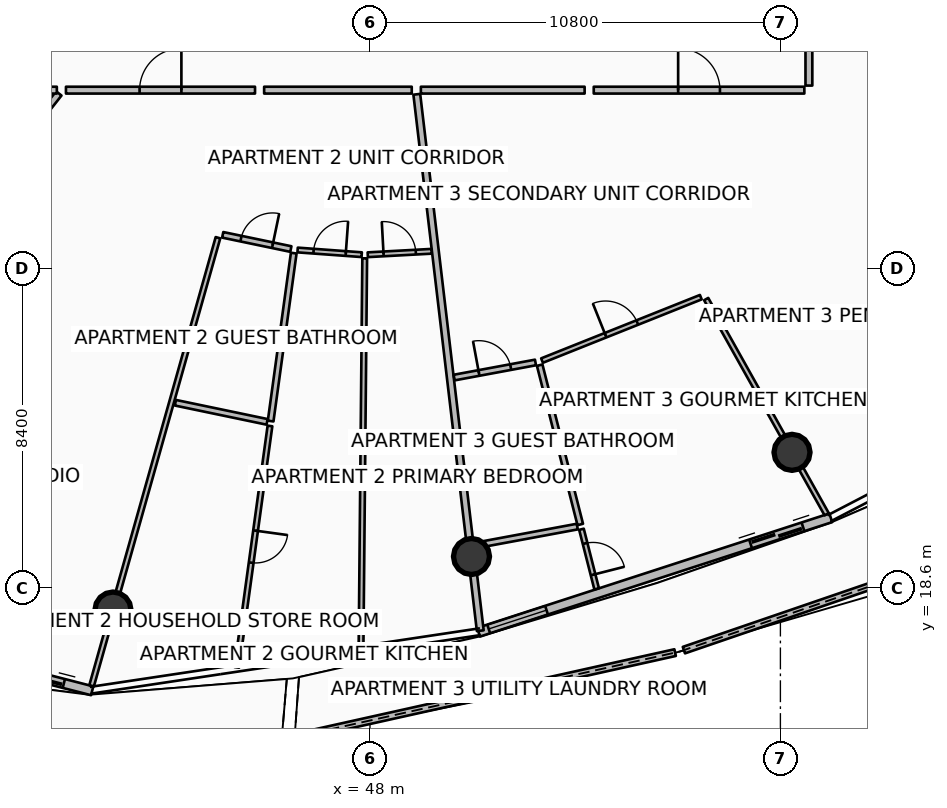
"""IFC4 building model, lengths in metres.
Left out: names, types, materials, properties, quantities, classifications, styles, units other than length and angle.
Written with IfcOpenShell. Run it as: python <this file> out.ifc"""

import sys

from ifc_helpers import new_model, si_unit, direction, frame, frame_2d, origin, origin_2d, place, context, subcontext, project, spatial, polyline, rectangle, circle, outline, extrude, element, fill, save


model = new_model("IFC4")
c1 = context("Model", 3, precision=1e-05, world=origin(), true_north=direction((0.0, 1.0)))
c2 = subcontext(c1, "Body", "Model", "MODEL_VIEW")
j1 = project(units=[si_unit("LENGTHUNIT", "METRE"), si_unit("PLANEANGLEUNIT", "RADIAN")], contexts=[c1])
p1 = place(None, origin())
s1 = spatial("IfcSite", under=j1, at=p1, CompositionType="ELEMENT")
p2 = place(p1, origin())
s2 = spatial("IfcBuilding", under=s1, at=p2, CompositionType="ELEMENT")
p3 = place(p2, frame((0.0, 0.0, 282.9)))
s3 = spatial("IfcBuildingStorey", under=s2, at=p3, CompositionType="ELEMENT", Elevation=282.9)
for number, where, z_axis, x_axis in (
    (1, (41.237, 18.021, 0.0), (0.0, 0.0, 1.0), (1.0, 0.0, 0.0)),
    (2, (50.671, 19.429, 0.0), (0.0, 0.0, 1.0), (1.0, 0.0, 0.0)),
    (3, (59.105, 22.17, 0.0), (0.0, 0.0, 1.0), (1.0, 0.0, 0.0)),
):
    element("IfcColumn", number, at=place(p3, frame(where, z_axis=z_axis, x_axis=x_axis)), inside=s3, PredefinedType="COLUMN", context=c2, shape_type="SweptSolid", body=[
        extrude(circle(Radius=0.475, at=origin_2d()), origin(), (0.0, 0.0, 1.0), 3.59),
    ])
p4 = place(p3, frame((46.017, 14.673, 0.0), z_axis=(0.0, 0.0, 1.0), x_axis=(0.976130464401, 0.217184982143, 0.0)))
e4 = element("IfcWall", 4, at=p4, inside=s3, PredefinedType="PARAPET", context=c2, shape_type="SweptSolid", body=[
    extrude(outline(polyline([(0.0, 0.0), (10.258, 0.0), (10.257, 1.348), (5.129, 1.182), (0.0, 1.12), (0.0, 0.0)])), frame((0.0, 0.09, 0.0), z_axis=(0.0, -1.0, 0.0), x_axis=(1.0, 0.0, 0.0)), (0.0, 0.0, 1.0), 0.18),
])
p5 = place(p3, frame((56.26, 16.966, 0.0), z_axis=(0.0, 0.0, 1.0), x_axis=(0.945994037051, 0.32418402469, 0.0)))
e5 = element("IfcWall", 5, at=p5, inside=s3, PredefinedType="PARAPET", context=c2, shape_type="SweptSolid", body=[
    extrude(outline(polyline([(0.0, 0.0), (10.544, 0.0), (10.544, 1.747), (5.272, 1.562), (0.0, 1.348), (0.0, 0.0)])), frame((0.0, 0.09, 0.0), z_axis=(0.0, -1.0, 0.0), x_axis=(1.0, 0.0, 0.0)), (0.0, 0.0, 1.0), 0.18),
])
p6 = place(p3, frame((29.614, 18.751, 0.0), z_axis=(0.0, 0.0, 1.0), x_axis=(0.968343758421, -0.249620442927, 0.0)))
e6 = element("IfcWall", 6, at=p6, inside=s3, PredefinedType="SOLIDWALL", context=c2, shape_type="SweptSolid", body=[
    extrude(rectangle(XDim=11.438, YDim=0.24, at=frame_2d((5.719, 0.0))), origin(), (0.0, 0.0, 1.0), 2.54),
])
p7 = place(p6, frame((9.218, 0.0, 0.0)))
e7 = element("IfcOpeningElement", 7, at=p7, cuts=e6, PredefinedType="OPENING", context=c2, shape_type="SweptSolid", body=[
    extrude(rectangle(XDim=1.45, YDim=2.15, at=frame_2d((0.725, 1.075))), frame((0.0, 0.13, 0.0), z_axis=(0.0, -1.0, 0.0), x_axis=(1.0, 0.0, 0.0)), (0.0, 0.0, 1.0), 0.26),
])
p8 = place(p6, frame((0.28, 0.0, 0.65)))
e8 = element("IfcOpeningElement", 8, at=p8, cuts=e6, PredefinedType="OPENING", context=c2, shape_type="SweptSolid", body=[
    extrude(rectangle(XDim=1.6, YDim=1.5, at=frame_2d((0.8, 0.75))), frame((0.0, 0.13, 0.0), z_axis=(0.0, -1.0, 0.0), x_axis=(1.0, 0.0, 0.0)), (0.0, 0.0, 1.0), 0.26),
])
p9 = place(p3, frame((50.858, 17.436, 0.0), z_axis=(0.0, 0.0, 1.0), x_axis=(0.951055974609, 0.309018661507, 0.0)))
e9 = element("IfcWall", 9, at=p9, inside=s3, PredefinedType="SOLIDWALL", context=c2, shape_type="SweptSolid", body=[
    extrude(rectangle(XDim=9.745, YDim=0.24, at=frame_2d((4.873, 0.0))), origin(), (0.0, 0.0, 1.0), 2.54),
])
p10 = place(p9, frame((7.525, 0.0, 0.0)))
e10 = element("IfcOpeningElement", 10, at=p10, cuts=e9, PredefinedType="OPENING", context=c2, shape_type="SweptSolid", body=[
    extrude(rectangle(XDim=1.45, YDim=2.15, at=frame_2d((0.725, 1.075))), frame((0.0, 0.13, 0.0), z_axis=(0.0, -1.0, 0.0), x_axis=(1.0, 0.0, 0.0)), (0.0, 0.0, 1.0), 0.26),
])
p11 = place(p9, frame((0.28, 0.0, 0.65)))
e11 = element("IfcOpeningElement", 11, at=p11, cuts=e9, PredefinedType="OPENING", context=c2, shape_type="SweptSolid", body=[
    extrude(rectangle(XDim=1.6, YDim=1.5, at=frame_2d((0.8, 0.75))), frame((0.0, 0.13, 0.0), z_axis=(0.0, -1.0, 0.0), x_axis=(1.0, 0.0, 0.0)), (0.0, 0.0, 1.0), 0.26),
])
p12 = place(p3, frame((39.812, 31.614, 0.0), z_axis=(0.0, 0.0, 1.0), x_axis=(-0.619097230176, -0.785314344443, 0.0)))
e12 = element("IfcWall", 12, at=p12, inside=s3, PredefinedType="PARTITIONING", context=c2, shape_type="SweptSolid", body=[
    extrude(rectangle(XDim=16.37, YDim=0.18, at=frame_2d((8.185, 0.0))), origin(), (0.0, 0.0, 1.0), 2.957),
])
p13 = place(p3, frame((49.232, 31.591, 0.0), z_axis=(0.0, 0.0, 1.0), x_axis=(0.117545848714, -0.993067456646, 0.0)))
e13 = element("IfcWall", 13, at=p13, inside=s3, PredefinedType="PARTITIONING", context=c2, shape_type="SweptSolid", body=[
    extrude(rectangle(XDim=14.213, YDim=0.18, at=frame_2d((7.106, 0.0))), origin(), (0.0, 0.0, 1.0), 2.957),
])
p14 = place(p3, frame((37.42, 31.7, 0.0), z_axis=(0.0, 0.0, 1.0), x_axis=(1.0, 0.0, 0.0)))
e14 = element("IfcWall", 14, at=p14, inside=s3, PredefinedType="PARTITIONING", context=c2, shape_type="SweptSolid", body=[
    extrude(rectangle(XDim=2.34, YDim=0.18, at=frame_2d((1.17, 0.0))), origin(), (0.0, 0.0, 1.0), 2.957),
])
p15 = place(p3, frame((40.0, 31.7, 0.0), z_axis=(0.0, 0.0, 1.0), x_axis=(1.0, 0.0, 0.0)))
e15 = element("IfcWall", 15, at=p15, inside=s3, PredefinedType="PARTITIONING", context=c2, shape_type="SweptSolid", body=[
    extrude(rectangle(XDim=4.975, YDim=0.18, at=frame_2d((2.488, 0.0))), origin(), (0.0, 0.0, 1.0), 2.957),
])
p16 = place(p15, frame((1.938, 0.0, 0.0)))
e16 = element("IfcOpeningElement", 16, at=p16, cuts=e15, PredefinedType="OPENING", context=c2, shape_type="SweptSolid", body=[
    extrude(rectangle(XDim=1.1, YDim=2.1, at=frame_2d((0.55, 1.05))), frame((0.0, 0.1, 0.0), z_axis=(0.0, -1.0, 0.0), x_axis=(1.0, 0.0, 0.0)), (0.0, 0.0, 1.0), 0.2),
])
p17 = place(p3, frame((45.215, 31.7, 0.0), z_axis=(0.0, 0.0, 1.0), x_axis=(1.0, 0.0, 0.0)))
e17 = element("IfcWall", 17, at=p17, inside=s3, PredefinedType="PARTITIONING", context=c2, shape_type="SweptSolid", body=[
    extrude(rectangle(XDim=3.884, YDim=0.18, at=frame_2d((1.942, 0.0))), origin(), (0.0, 0.0, 1.0), 2.957),
])
p18 = place(p3, frame((44.0, 27.817, 0.0), z_axis=(0.0, 0.0, 1.0), x_axis=(-0.271434127064, -0.962457019646, 0.0)))
e18 = element("IfcWall", 18, at=p18, inside=s3, PredefinedType="PARTITIONING", context=c2, shape_type="SweptSolid", body=[
    extrude(rectangle(XDim=12.249, YDim=0.125, at=frame_2d((6.125, 0.0))), origin(), (0.0, 0.0, 1.0), 2.957),
])
p19 = place(p3, frame((44.125, 27.893, 0.0), z_axis=(0.0, 0.0, 1.0), x_axis=(0.978900502262, -0.204337482294, 0.0)))
e19 = element("IfcWall", 19, at=p19, inside=s3, PredefinedType="PARTITIONING", context=c2, shape_type="SweptSolid", body=[
    extrude(rectangle(XDim=1.832, YDim=0.15, at=frame_2d((0.916, 0.0))), origin(), (0.0, 0.0, 1.0), 2.957),
])
p20 = place(p19, frame((0.491, 0.0, 0.0)))
e20 = element("IfcOpeningElement", 20, at=p20, cuts=e19, PredefinedType="OPENING", context=c2, shape_type="SweptSolid", body=[
    extrude(rectangle(XDim=0.85, YDim=2.06, at=frame_2d((0.425, 1.03))), frame((0.0, 0.085, 0.0), z_axis=(0.0, -1.0, 0.0), x_axis=(1.0, 0.0, 0.0)), (0.0, 0.0, 1.0), 0.17),
])
p21 = place(p3, frame((42.879, 23.475, 0.0), z_axis=(0.0, 0.0, 1.0), x_axis=(0.978912814884, -0.204278488479, 0.0)))
e21 = element("IfcWall", 21, at=p21, inside=s3, PredefinedType="PARTITIONING", context=c2, shape_type="SweptSolid", body=[
    extrude(rectangle(XDim=2.466, YDim=0.15, at=frame_2d((1.233, 0.0))), origin(), (0.0, 0.0, 1.0), 2.957),
])
p22 = place(p3, frame((45.994, 27.411, 0.0), z_axis=(0.0, 0.0, 1.0), x_axis=(-0.136246545396, -0.99067496126, 0.0)))
e22 = element("IfcWall", 22, at=p22, inside=s3, PredefinedType="PARTITIONING", context=c2, shape_type="SweptSolid", body=[
    extrude(rectangle(XDim=4.46, YDim=0.15, at=frame_2d((2.23, 0.0))), origin(), (0.0, 0.0, 1.0), 3.03),
])
p23 = place(p3, frame((45.368, 22.864, 0.0), z_axis=(0.0, 0.0, 1.0), x_axis=(-0.136200589596, -0.99068128043, 0.0)))
e23 = element("IfcWall", 23, at=p23, inside=s3, PredefinedType="PARTITIONING", context=c2, shape_type="SweptSolid", body=[
    extrude(rectangle(XDim=6.412, YDim=0.125, at=frame_2d((3.206, 0.0))), origin(), (0.0, 0.0, 1.0), 3.03),
])
p24 = place(p23, frame((2.781, 0.0, 0.0)))
e24 = element("IfcOpeningElement", 24, at=p24, cuts=e23, PredefinedType="OPENING", context=c2, shape_type="SweptSolid", body=[
    extrude(rectangle(XDim=0.85, YDim=2.06, at=frame_2d((0.425, 1.03))), frame((0.0, 0.073, 0.0), z_axis=(0.0, -1.0, 0.0), x_axis=(1.0, 0.0, 0.0)), (0.0, 0.0, 1.0), 0.145),
])
p25 = place(p3, frame((47.861, 27.275, 0.0), z_axis=(0.0, 0.0, 1.0), x_axis=(-0.009436905939, -0.999955471412, 0.0)))
e25 = element("IfcWall", 25, at=p25, inside=s3, PredefinedType="PARTITIONING", context=c2, shape_type="SweptSolid", body=[
    extrude(rectangle(XDim=10.271, YDim=0.125, at=frame_2d((5.135, 0.0))), origin(), (0.0, 0.0, 1.0), 3.03),
])
p26 = place(p3, frame((46.096, 27.494, 0.0), z_axis=(0.0, 0.0, 1.0), x_axis=(0.997337823183, -0.072919588925, 0.0)))
e26 = element("IfcWall", 26, at=p26, inside=s3, PredefinedType="PARTITIONING", context=c2, shape_type="SweptSolid", body=[
    extrude(rectangle(XDim=1.691, YDim=0.125, at=frame_2d((0.845, 0.0))), origin(), (0.0, 0.0, 1.0), 3.03),
])
p27 = place(p26, frame((0.42, 0.0, 0.0)))
e27 = element("IfcOpeningElement", 27, at=p27, cuts=e26, PredefinedType="OPENING", context=c2, shape_type="SweptSolid", body=[
    extrude(rectangle(XDim=0.85, YDim=2.06, at=frame_2d((0.425, 1.03))), frame((0.0, 0.073, 0.0), z_axis=(0.0, -1.0, 0.0), x_axis=(1.0, 0.0, 0.0)), (0.0, 0.0, 1.0), 0.145),
])
p28 = place(p3, frame((47.942, 27.369, 0.0), z_axis=(0.0, 0.0, 1.0), x_axis=(0.998523596101, 0.054319683628, 0.0)))
e28 = element("IfcWall", 28, at=p28, inside=s3, PredefinedType="PARTITIONING", context=c2, shape_type="SweptSolid", body=[
    extrude(rectangle(XDim=1.681, YDim=0.125, at=frame_2d((0.84, 0.0))), origin(), (0.0, 0.0, 1.0), 3.03),
])
p29 = place(p28, frame((0.415, 0.0, 0.0)))
e29 = element("IfcOpeningElement", 29, at=p29, cuts=e28, PredefinedType="OPENING", context=c2, shape_type="SweptSolid", body=[
    extrude(rectangle(XDim=0.85, YDim=2.06, at=frame_2d((0.425, 1.03))), frame((0.0, 0.073, 0.0), z_axis=(0.0, -1.0, 0.0), x_axis=(1.0, 0.0, 0.0)), (0.0, 0.0, 1.0), 0.145),
])
p30 = place(p3, frame((53.888, 31.7, 0.0), z_axis=(0.0, 0.0, 1.0), x_axis=(1.0, 0.0, 0.0)))
e30 = element("IfcWall", 30, at=p30, inside=s3, PredefinedType="PARTITIONING", context=c2, shape_type="SweptSolid", body=[
    extrude(rectangle(XDim=5.542, YDim=0.18, at=frame_2d((2.771, 0.0))), origin(), (0.0, 0.0, 1.0), 2.957),
])
p31 = place(p30, frame((2.221, 0.0, 0.0)))
e31 = element("IfcOpeningElement", 31, at=p31, cuts=e30, PredefinedType="OPENING", context=c2, shape_type="SweptSolid", body=[
    extrude(rectangle(XDim=1.1, YDim=2.1, at=frame_2d((0.55, 1.05))), frame((0.0, 0.1, 0.0), z_axis=(0.0, -1.0, 0.0), x_axis=(1.0, 0.0, 0.0)), (0.0, 0.0, 1.0), 0.2),
])
p32 = place(p3, frame((59.55, 31.82, 0.0), z_axis=(0.0, 0.0, 1.0), x_axis=(0.0, 1.0, 0.0)))
e32 = element("IfcWall", 32, at=p32, inside=s3, PredefinedType="PARTITIONING", context=c2, shape_type="SweptSolid", body=[
    extrude(rectangle(XDim=0.955, YDim=0.18, at=frame_2d((0.477, 0.0))), origin(), (0.0, 0.0, 1.0), 2.957),
])
p33 = place(p3, frame((49.339, 31.7, 0.0), z_axis=(0.0, 0.0, 1.0), x_axis=(1.0, 0.0, 0.0)))
e33 = element("IfcWall", 33, at=p33, inside=s3, PredefinedType="PARTITIONING", context=c2, shape_type="SweptSolid", body=[
    extrude(rectangle(XDim=4.309, YDim=0.18, at=frame_2d((2.155, 0.0))), origin(), (0.0, 0.0, 1.0), 2.957),
])
p34 = place(p3, frame((56.847, 26.203, 0.0), z_axis=(0.0, 0.0, 1.0), x_axis=(0.488636594114, -0.872487409017, 0.0)))
e34 = element("IfcWall", 34, at=p34, inside=s3, PredefinedType="PARTITIONING", context=c2, shape_type="SweptSolid", body=[
    extrude(rectangle(XDim=6.489, YDim=0.125, at=frame_2d((3.244, 0.0))), origin(), (0.0, 0.0, 1.0), 2.957),
])
p35 = place(p3, frame((50.215, 24.137, 0.0), z_axis=(0.0, 0.0, 1.0), x_axis=(0.983215758485, 0.182446628542, 0.0)))
e35 = element("IfcWall", 35, at=p35, inside=s3, PredefinedType="PARTITIONING", context=c2, shape_type="SweptSolid", body=[
    extrude(rectangle(XDim=2.177, YDim=0.15, at=frame_2d((1.089, 0.0))), origin(), (0.0, 0.0, 1.0), 2.957),
])
p36 = place(p35, frame((0.664, 0.0, 0.0)))
e36 = element("IfcOpeningElement", 36, at=p36, cuts=e35, PredefinedType="OPENING", context=c2, shape_type="SweptSolid", body=[
    extrude(rectangle(XDim=0.85, YDim=2.06, at=frame_2d((0.425, 1.03))), frame((0.0, 0.085, 0.0), z_axis=(0.0, -1.0, 0.0), x_axis=(1.0, 0.0, 0.0)), (0.0, 0.0, 1.0), 0.17),
])
p37 = place(p3, frame((50.738, 19.712, 0.0), z_axis=(0.0, 0.0, 1.0), x_axis=(0.983195760322, 0.18255436693, 0.0)))
e37 = element("IfcWall", 37, at=p37, inside=s3, PredefinedType="PARTITIONING", context=c2, shape_type="SweptSolid", body=[
    extrude(rectangle(XDim=2.763, YDim=0.15, at=frame_2d((1.381, 0.0))), origin(), (0.0, 0.0, 1.0), 2.957),
])
p38 = place(p3, frame((52.466, 24.464, 0.0), z_axis=(0.0, 0.0, 1.0), x_axis=(0.246795883472, -0.969067485731, 0.0)))
e38 = element("IfcWall", 38, at=p38, inside=s3, PredefinedType="PARTITIONING", context=c2, shape_type="SweptSolid", body=[
    extrude(rectangle(XDim=4.326, YDim=0.15, at=frame_2d((2.163, 0.0))), origin(), (0.0, 0.0, 1.0), 3.03),
])
p39 = place(p3, frame((53.565, 20.146, 0.0), z_axis=(0.0, 0.0, 1.0), x_axis=(0.24689818157, -0.969041427359, 0.0)))
e39 = element("IfcWall", 39, at=p39, inside=s3, PredefinedType="PARTITIONING", context=c2, shape_type="SweptSolid", body=[
    extrude(rectangle(XDim=1.619, YDim=0.125, at=frame_2d((0.809, 0.0))), origin(), (0.0, 0.0, 1.0), 3.03),
])
p40 = place(p39, frame((0.385, 0.0, 0.0)))
e40 = element("IfcOpeningElement", 40, at=p40, cuts=e39, PredefinedType="OPENING", context=c2, shape_type="SweptSolid", body=[
    extrude(rectangle(XDim=0.85, YDim=2.06, at=frame_2d((0.425, 1.03))), frame((0.0, 0.073, 0.0), z_axis=(0.0, -1.0, 0.0), x_axis=(1.0, 0.0, 0.0)), (0.0, 0.0, 1.0), 0.145),
])
p41 = place(p3, frame((52.527, 24.584, 0.0), z_axis=(0.0, 0.0, 1.0), x_axis=(0.928678664633, 0.370885343274, 0.0)))
e41 = element("IfcWall", 41, at=p41, inside=s3, PredefinedType="PARTITIONING", context=c2, shape_type="SweptSolid", body=[
    extrude(rectangle(XDim=4.499, YDim=0.125, at=frame_2d((2.249, 0.0))), origin(), (0.0, 0.0, 1.0), 2.957),
])
p42 = place(p41, frame((1.799, 0.0, 0.0)))
e42 = element("IfcOpeningElement", 42, at=p42, cuts=e41, PredefinedType="OPENING", context=c2, shape_type="SweptSolid", body=[
    extrude(rectangle(XDim=0.9, YDim=2.08, at=frame_2d((0.45, 1.04))), frame((0.0, 0.073, 0.0), z_axis=(0.0, -1.0, 0.0), x_axis=(1.0, 0.0, 0.0)), (0.0, 0.0, 1.0), 0.145),
])
p43 = place(p7, origin())
e43 = element("IfcDoor", 43, at=p43, inside=s3, OperationType="DOUBLE_DOOR_SLIDING", PredefinedType="DOOR", context=c2, shape_type="SweptSolid", body=[
    extrude(rectangle(XDim=1.45, YDim=2.15, at=frame_2d((0.725, 1.075))), frame((0.0, 0.025, 0.0), z_axis=(0.0, -1.0, 0.0), x_axis=(1.0, 0.0, 0.0)), (0.0, 0.0, 1.0), 0.05),
])
fill(e7, e43)
p44 = place(p10, origin())
e44 = element("IfcDoor", 44, at=p44, inside=s3, OperationType="DOUBLE_DOOR_SLIDING", PredefinedType="DOOR", context=c2, shape_type="SweptSolid", body=[
    extrude(rectangle(XDim=1.45, YDim=2.15, at=frame_2d((0.725, 1.075))), frame((0.0, 0.025, 0.0), z_axis=(0.0, -1.0, 0.0), x_axis=(1.0, 0.0, 0.0)), (0.0, 0.0, 1.0), 0.05),
])
fill(e10, e44)
p45 = place(p11, origin())
e45 = element("IfcWindow", 45, at=p45, inside=s3, PartitioningType="SINGLE_PANEL", PredefinedType="WINDOW", context=c2, shape_type="SweptSolid", body=[
    extrude(rectangle(XDim=1.6, YDim=1.5, at=frame_2d((0.8, 0.75))), frame((0.0, 0.03, 0.0), z_axis=(0.0, -1.0, 0.0), x_axis=(1.0, 0.0, 0.0)), (0.0, 0.0, 1.0), 0.06),
])
fill(e11, e45)
p46 = place(p16, origin())
e46 = element("IfcDoor", 46, at=p46, inside=s3, OperationType="SINGLE_SWING_RIGHT", PredefinedType="DOOR", context=c2, shape_type="SweptSolid", body=[
    extrude(rectangle(XDim=1.1, YDim=2.1, at=frame_2d((0.55, 1.05))), frame((0.0, 0.025, 0.0), z_axis=(0.0, -1.0, 0.0), x_axis=(1.0, 0.0, 0.0)), (0.0, 0.0, 1.0), 0.05),
])
fill(e16, e46)
p47 = place(p20, origin())
e47 = element("IfcDoor", 47, at=p47, inside=s3, OperationType="SINGLE_SWING_RIGHT", PredefinedType="DOOR", context=c2, shape_type="SweptSolid", body=[
    extrude(rectangle(XDim=0.85, YDim=2.06, at=frame_2d((0.425, 1.03))), frame((0.0, 0.025, 0.0), z_axis=(0.0, -1.0, 0.0), x_axis=(1.0, 0.0, 0.0)), (0.0, 0.0, 1.0), 0.05),
])
fill(e20, e47)
p48 = place(p24, origin())
e48 = element("IfcDoor", 48, at=p48, inside=s3, OperationType="SINGLE_SWING_LEFT", PredefinedType="DOOR", context=c2, shape_type="SweptSolid", body=[
    extrude(rectangle(XDim=0.85, YDim=2.06, at=frame_2d((0.425, 1.03))), frame((0.0, 0.025, 0.0), z_axis=(0.0, -1.0, 0.0), x_axis=(1.0, 0.0, 0.0)), (0.0, 0.0, 1.0), 0.05),
])
fill(e24, e48)
p49 = place(p27, origin())
e49 = element("IfcDoor", 49, at=p49, inside=s3, OperationType="SINGLE_SWING_RIGHT", PredefinedType="DOOR", context=c2, shape_type="SweptSolid", body=[
    extrude(rectangle(XDim=0.85, YDim=2.06, at=frame_2d((0.425, 1.03))), frame((0.0, 0.025, 0.0), z_axis=(0.0, -1.0, 0.0), x_axis=(1.0, 0.0, 0.0)), (0.0, 0.0, 1.0), 0.05),
])
fill(e27, e49)
p50 = place(p29, origin())
e50 = element("IfcDoor", 50, at=p50, inside=s3, OperationType="SINGLE_SWING_LEFT", PredefinedType="DOOR", context=c2, shape_type="SweptSolid", body=[
    extrude(rectangle(XDim=0.85, YDim=2.06, at=frame_2d((0.425, 1.03))), frame((0.0, 0.025, 0.0), z_axis=(0.0, -1.0, 0.0), x_axis=(1.0, 0.0, 0.0)), (0.0, 0.0, 1.0), 0.05),
])
fill(e29, e50)
p51 = place(p31, origin())
e51 = element("IfcDoor", 51, at=p51, inside=s3, OperationType="SINGLE_SWING_LEFT", PredefinedType="DOOR", context=c2, shape_type="SweptSolid", body=[
    extrude(rectangle(XDim=1.1, YDim=2.1, at=frame_2d((0.55, 1.05))), frame((0.0, 0.025, 0.0), z_axis=(0.0, -1.0, 0.0), x_axis=(1.0, 0.0, 0.0)), (0.0, 0.0, 1.0), 0.05),
])
fill(e31, e51)
p52 = place(p36, origin())
e52 = element("IfcDoor", 52, at=p52, inside=s3, OperationType="SINGLE_SWING_LEFT", PredefinedType="DOOR", context=c2, shape_type="SweptSolid", body=[
    extrude(rectangle(XDim=0.85, YDim=2.06, at=frame_2d((0.425, 1.03))), frame((0.0, 0.025, 0.0), z_axis=(0.0, -1.0, 0.0), x_axis=(1.0, 0.0, 0.0)), (0.0, 0.0, 1.0), 0.05),
])
fill(e36, e52)
p53 = place(p40, origin())
e53 = element("IfcDoor", 53, at=p53, inside=s3, OperationType="SINGLE_SWING_RIGHT", PredefinedType="DOOR", context=c2, shape_type="SweptSolid", body=[
    extrude(rectangle(XDim=0.85, YDim=2.06, at=frame_2d((0.425, 1.03))), frame((0.0, 0.025, 0.0), z_axis=(0.0, -1.0, 0.0), x_axis=(1.0, 0.0, 0.0)), (0.0, 0.0, 1.0), 0.05),
])
fill(e40, e53)
p54 = place(p42, origin())
e54 = element("IfcDoor", 54, at=p54, inside=s3, OperationType="SINGLE_SWING_LEFT", PredefinedType="DOOR", context=c2, shape_type="SweptSolid", body=[
    extrude(rectangle(XDim=0.9, YDim=2.08, at=frame_2d((0.45, 1.04))), frame((0.0, 0.025, 0.0), z_axis=(0.0, -1.0, 0.0), x_axis=(1.0, 0.0, 0.0)), (0.0, 0.0, 1.0), 0.05),
])
fill(e42, e54)
save(model, sys.argv[1])
